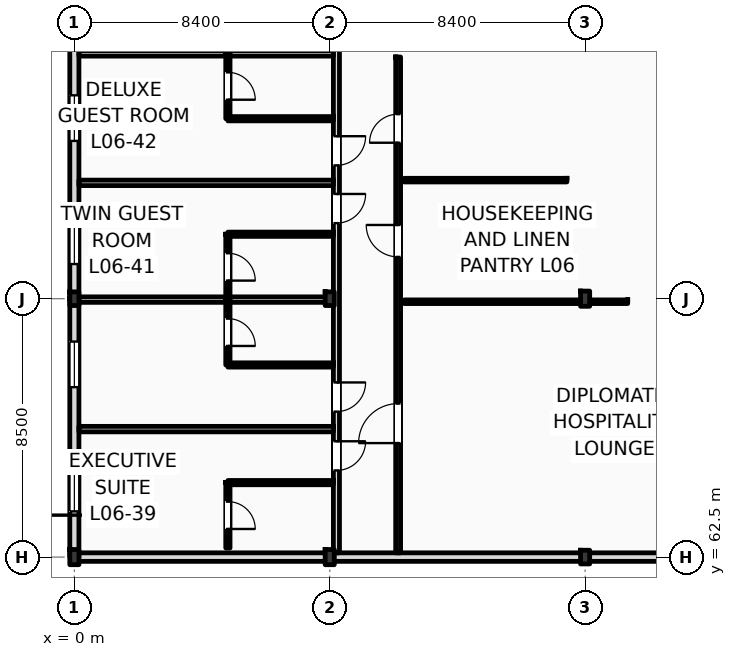
"""IFC4 building model, lengths in metres.
Left out: names, types, materials, properties, quantities, classifications, styles, units other than length and angle.
Written with IfcOpenShell. Run it as: python <this file> out.ifc"""

import sys

from ifc_helpers import new_model, si_unit, direction, frame, frame_2d, origin, origin_2d, place, context, subcontext, project, spatial, rectangle, i_section, extrude, element, fill, save


model = new_model("IFC4")
c1 = context("Model", 3, precision=1e-05, world=origin(), true_north=direction((0.0, 1.0)))
c2 = subcontext(c1, "Body", "Model", "MODEL_VIEW")
j1 = project(units=[si_unit("LENGTHUNIT", "METRE"), si_unit("PLANEANGLEUNIT", "RADIAN")], contexts=[c1])
p1 = place(None, origin())
s1 = spatial("IfcSite", under=j1, at=p1, CompositionType="ELEMENT")
p2 = place(p1, origin())
s2 = spatial("IfcBuilding", under=s1, at=p2, CompositionType="ELEMENT")
p3 = place(p2, frame((0.0, 0.0, 28.2)))
s3 = spatial("IfcBuildingStorey", under=s2, at=p3, CompositionType="ELEMENT", Elevation=28.2)
p4 = place(p3, frame((0.0, 62.5, 0.0), z_axis=(0.0, 0.0, 1.0), x_axis=(1.0, 0.0, 0.0)))
e1 = element("IfcColumn", 1, at=p4, inside=s3, PredefinedType="COLUMN", context=c2, shape_type="SweptSolid", body=[
    extrude(i_section(OverallWidth=0.3, OverallDepth=0.5, WebThickness=0.014, FlangeThickness=0.028, FilletRadius=0.027, at=origin_2d()), origin(), (0.0, 0.0, 1.0), 3.6),
])
p5 = place(p3, frame((0.0, 71.0, 0.0), z_axis=(0.0, 0.0, 1.0), x_axis=(1.0, 0.0, 0.0)))
e2 = element("IfcColumn", 2, at=p5, inside=s3, PredefinedType="COLUMN", context=c2, shape_type="SweptSolid", body=[
    extrude(i_section(OverallWidth=0.3, OverallDepth=0.45, WebThickness=0.014, FlangeThickness=0.026, FilletRadius=0.027, at=origin_2d()), origin(), (0.0, 0.0, 1.0), 3.6),
])
p6 = place(p3, frame((8.4, 62.5, 0.0), z_axis=(0.0, 0.0, 1.0), x_axis=(1.0, 0.0, 0.0)))
e3 = element("IfcColumn", 3, at=p6, inside=s3, PredefinedType="COLUMN", context=c2, shape_type="SweptSolid", body=[
    extrude(i_section(OverallWidth=0.3, OverallDepth=0.5, WebThickness=0.014, FlangeThickness=0.028, FilletRadius=0.027, at=origin_2d()), origin(), (0.0, 0.0, 1.0), 3.6),
])
for number, where, z_axis, x_axis in (
    (4, (8.4, 71.0, 0.0), (0.0, 0.0, 1.0), (1.0, 0.0, 0.0)),
    (5, (16.8, 62.5, 0.0), (0.0, 0.0, 1.0), (1.0, 0.0, 0.0)),
):
    element("IfcColumn", number, at=place(p3, frame(where, z_axis=z_axis, x_axis=x_axis)), inside=s3, PredefinedType="COLUMN", context=c2, shape_type="SweptSolid", body=[
        extrude(i_section(OverallWidth=0.3, OverallDepth=0.45, WebThickness=0.014, FlangeThickness=0.026, FilletRadius=0.027, at=origin_2d()), origin(), (0.0, 0.0, 1.0), 3.6),
    ])
p7 = place(p3, frame((16.8, 71.0, 0.0), z_axis=(0.0, 0.0, 1.0), x_axis=(1.0, 0.0, 0.0)))
e6 = element("IfcColumn", 6, at=p7, inside=s3, PredefinedType="COLUMN", context=c2, shape_type="SweptSolid", body=[
    extrude(i_section(OverallWidth=0.3, OverallDepth=0.5, WebThickness=0.014, FlangeThickness=0.028, FilletRadius=0.027, at=origin_2d()), origin(), (0.0, 0.0, 1.0), 3.6),
])
p8 = place(p3, frame((0.0, 62.5, 0.0), z_axis=(0.0, 0.0, 1.0), x_axis=(0.0, 1.0, 0.0)))
e7 = element("IfcWall", 7, at=p8, inside=s3, PredefinedType="STANDARD", context=c2, shape_type="SweptSolid", body=[
    extrude(rectangle(XDim=8.5, YDim=0.3, at=frame_2d((4.25, 0.0))), origin(), (0.0, 0.0, 1.0), 2.99),
])
p9 = place(p8, frame((1.505, 0.0, 0.9)))
e8 = element("IfcOpeningElement", 8, at=p9, cuts=e7, PredefinedType="OPENING", context=c2, shape_type="SweptSolid", body=[
    extrude(rectangle(XDim=1.5, YDim=1.91, at=frame_2d((0.75, 0.955))), frame((0.0, 0.16, 0.0), z_axis=(0.0, -1.0, 0.0), x_axis=(1.0, 0.0, 0.0)), (0.0, 0.0, 1.0), 0.32),
])
p10 = place(p8, frame((5.59, 0.0, 0.9)))
e9 = element("IfcOpeningElement", 9, at=p10, cuts=e7, PredefinedType="OPENING", context=c2, shape_type="SweptSolid", body=[
    extrude(rectangle(XDim=1.5, YDim=1.91, at=frame_2d((0.75, 0.955))), frame((0.0, 0.16, 0.0), z_axis=(0.0, -1.0, 0.0), x_axis=(1.0, 0.0, 0.0)), (0.0, 0.0, 1.0), 0.32),
])
p11 = place(p3, frame((0.0, 71.0, 0.0), z_axis=(0.0, 0.0, 1.0), x_axis=(0.0, 1.0, 0.0)))
e10 = element("IfcWall", 10, at=p11, inside=s3, PredefinedType="STANDARD", context=c2, shape_type="SweptSolid", body=[
    extrude(rectangle(XDim=8.5, YDim=0.3, at=frame_2d((4.25, 0.0))), origin(), (0.0, 0.0, 1.0), 2.99),
])
p12 = place(p11, frame((1.14, 0.0, 0.9)))
e11 = element("IfcOpeningElement", 11, at=p12, cuts=e10, PredefinedType="OPENING", context=c2, shape_type="SweptSolid", body=[
    extrude(rectangle(XDim=1.5, YDim=1.91, at=frame_2d((0.75, 0.955))), frame((0.0, 0.16, 0.0), z_axis=(0.0, -1.0, 0.0), x_axis=(1.0, 0.0, 0.0)), (0.0, 0.0, 1.0), 0.32),
])
p13 = place(p11, frame((5.19, 0.0, 0.9)))
e12 = element("IfcOpeningElement", 12, at=p13, cuts=e10, PredefinedType="OPENING", context=c2, shape_type="SweptSolid", body=[
    extrude(rectangle(XDim=1.5, YDim=1.91, at=frame_2d((0.75, 0.955))), frame((0.0, 0.16, 0.0), z_axis=(0.0, -1.0, 0.0), x_axis=(1.0, 0.0, 0.0)), (0.0, 0.0, 1.0), 0.32),
])
p14 = place(p3, frame((0.0, 62.5, 0.0), z_axis=(0.0, 0.0, 1.0), x_axis=(1.0, 0.0, 0.0)))
e13 = element("IfcWall", 13, at=p14, inside=s3, PredefinedType="STANDARD", context=c2, shape_type="SweptSolid", body=[
    extrude(rectangle(XDim=25.2, YDim=0.28, at=frame_2d((12.6, 0.0))), origin(), (0.0, 0.0, 1.0), 2.8),
])
p15 = place(p3, frame((8.62, 62.64, 0.0), z_axis=(0.0, 0.0, 1.0), x_axis=(0.0, 1.0, 0.0)))
e14 = element("IfcWall", 14, at=p15, inside=s3, PredefinedType="PARTITIONING", context=c2, shape_type="SweptSolid", body=[
    extrude(rectangle(XDim=32.66, YDim=0.2, at=frame_2d((16.33, 0.0))), origin(), (0.0, 0.0, 1.0), 2.99),
])
p16 = place(p15, frame((2.71, 0.0, 0.0)))
e15 = element("IfcOpeningElement", 15, at=p16, cuts=e14, PredefinedType="OPENING", context=c2, shape_type="SweptSolid", body=[
    extrude(rectangle(XDim=0.96, YDim=2.2, at=frame_2d((0.48, 1.1))), frame((0.0, 0.11, 0.0), z_axis=(0.0, -1.0, 0.0), x_axis=(1.0, 0.0, 0.0)), (0.0, 0.0, 1.0), 0.22),
])
p17 = place(p15, frame((4.645, 0.0, 0.0)))
e16 = element("IfcOpeningElement", 16, at=p17, cuts=e14, PredefinedType="OPENING", context=c2, shape_type="SweptSolid", body=[
    extrude(rectangle(XDim=0.96, YDim=2.2, at=frame_2d((0.48, 1.1))), frame((0.0, 0.11, 0.0), z_axis=(0.0, -1.0, 0.0), x_axis=(1.0, 0.0, 0.0)), (0.0, 0.0, 1.0), 0.22),
])
p18 = place(p15, frame((10.845, 0.0, 0.0)))
e17 = element("IfcOpeningElement", 17, at=p18, cuts=e14, PredefinedType="OPENING", context=c2, shape_type="SweptSolid", body=[
    extrude(rectangle(XDim=0.96, YDim=2.2, at=frame_2d((0.48, 1.1))), frame((0.0, 0.11, 0.0), z_axis=(0.0, -1.0, 0.0), x_axis=(1.0, 0.0, 0.0)), (0.0, 0.0, 1.0), 0.22),
])
p19 = place(p15, frame((12.745, 0.0, 0.0)))
e18 = element("IfcOpeningElement", 18, at=p19, cuts=e14, PredefinedType="OPENING", context=c2, shape_type="SweptSolid", body=[
    extrude(rectangle(XDim=0.96, YDim=2.2, at=frame_2d((0.48, 1.1))), frame((0.0, 0.11, 0.0), z_axis=(0.0, -1.0, 0.0), x_axis=(1.0, 0.0, 0.0)), (0.0, 0.0, 1.0), 0.22),
])
p20 = place(p15, frame((18.945, 0.0, 0.0)))
e19 = element("IfcOpeningElement", 19, at=p20, cuts=e14, PredefinedType="OPENING", context=c2, shape_type="SweptSolid", body=[
    extrude(rectangle(XDim=0.96, YDim=2.2, at=frame_2d((0.48, 1.1))), frame((0.0, 0.11, 0.0), z_axis=(0.0, -1.0, 0.0), x_axis=(1.0, 0.0, 0.0)), (0.0, 0.0, 1.0), 0.22),
])
p21 = place(p15, frame((22.995, 0.0, 0.0)))
e20 = element("IfcOpeningElement", 20, at=p21, cuts=e14, PredefinedType="OPENING", context=c2, shape_type="SweptSolid", body=[
    extrude(rectangle(XDim=0.96, YDim=2.2, at=frame_2d((0.48, 1.1))), frame((0.0, 0.11, 0.0), z_axis=(0.0, -1.0, 0.0), x_axis=(1.0, 0.0, 0.0)), (0.0, 0.0, 1.0), 0.22),
])
p22 = place(p15, frame((27.045, 0.0, 0.0)))
e21 = element("IfcOpeningElement", 21, at=p22, cuts=e14, PredefinedType="OPENING", context=c2, shape_type="SweptSolid", body=[
    extrude(rectangle(XDim=0.96, YDim=2.2, at=frame_2d((0.48, 1.1))), frame((0.0, 0.11, 0.0), z_axis=(0.0, -1.0, 0.0), x_axis=(1.0, 0.0, 0.0)), (0.0, 0.0, 1.0), 0.22),
])
p23 = place(p15, frame((31.06, 0.0, 0.0)))
e22 = element("IfcOpeningElement", 22, at=p23, cuts=e14, PredefinedType="OPENING", context=c2, shape_type="SweptSolid", body=[
    extrude(rectangle(XDim=0.96, YDim=2.2, at=frame_2d((0.48, 1.1))), frame((0.0, 0.11, 0.0), z_axis=(0.0, -1.0, 0.0), x_axis=(1.0, 0.0, 0.0)), (0.0, 0.0, 1.0), 0.22),
])
p24 = place(p3, frame((10.65, 62.64, 0.0), z_axis=(0.0, 0.0, 1.0), x_axis=(0.0, 1.0, 0.0)))
e23 = element("IfcWall", 23, at=p24, inside=s3, PredefinedType="PARTITIONING", context=c2, shape_type="SweptSolid", body=[
    extrude(rectangle(XDim=16.31, YDim=0.16, at=frame_2d((8.155, 0.0))), origin(), (0.0, 0.0, 1.0), 3.36),
])
p25 = place(p24, frame((3.61, 0.0, 0.0)))
e24 = element("IfcOpeningElement", 24, at=p25, cuts=e23, PredefinedType="OPENING", context=c2, shape_type="SweptSolid", body=[
    extrude(rectangle(XDim=1.3, YDim=2.2, at=frame_2d((0.65, 1.1))), frame((0.0, 0.09, 0.0), z_axis=(0.0, -1.0, 0.0), x_axis=(1.0, 0.0, 0.0)), (0.0, 0.0, 1.0), 0.18),
])
p26 = place(p24, frame((9.735, 0.0, 0.0)))
e25 = element("IfcOpeningElement", 25, at=p26, cuts=e23, PredefinedType="OPENING", context=c2, shape_type="SweptSolid", body=[
    extrude(rectangle(XDim=1.05, YDim=2.12, at=frame_2d((0.525, 1.06))), frame((0.0, 0.09, 0.0), z_axis=(0.0, -1.0, 0.0), x_axis=(1.0, 0.0, 0.0)), (0.0, 0.0, 1.0), 0.18),
])
p27 = place(p24, frame((13.49, 0.0, 0.0)))
e26 = element("IfcOpeningElement", 26, at=p27, cuts=e23, PredefinedType="OPENING", context=c2, shape_type="SweptSolid", body=[
    extrude(rectangle(XDim=0.94, YDim=2.15, at=frame_2d((0.47, 1.075))), frame((0.0, 0.09, 0.0), z_axis=(0.0, -1.0, 0.0), x_axis=(1.0, 0.0, 0.0)), (0.0, 0.0, 1.0), 0.18),
])
p28 = place(p3, frame((0.15, 66.71, 0.0), z_axis=(0.0, 0.0, 1.0), x_axis=(1.0, 0.0, 0.0)))
e27 = element("IfcWall", 27, at=p28, inside=s3, PredefinedType="PARTITIONING", context=c2, shape_type="SweptSolid", body=[
    extrude(rectangle(XDim=8.37, YDim=0.18, at=frame_2d((4.185, 0.0))), origin(), (0.0, 0.0, 1.0), 3.36),
])
p29 = place(p3, frame((5.05, 64.95, 0.0), z_axis=(0.0, 0.0, 1.0), x_axis=(1.0, 0.0, 0.0)))
e28 = element("IfcWall", 28, at=p29, inside=s3, PredefinedType="PARTITIONING", context=c2, shape_type="SweptSolid", body=[
    extrude(rectangle(XDim=3.47, YDim=0.14, at=frame_2d((1.735, 0.0))), origin(), (0.0, 0.0, 1.0), 3.36),
])
p30 = place(p3, frame((5.05, 62.8, 0.0), z_axis=(0.0, 0.0, 1.0), x_axis=(0.0, 1.0, 0.0)))
e29 = element("IfcWall", 29, at=p30, inside=s3, PredefinedType="PARTITIONING", context=c2, shape_type="SweptSolid", body=[
    extrude(rectangle(XDim=2.15, YDim=0.14, at=frame_2d((1.075, 0.0))), origin(), (0.0, 0.0, 1.0), 3.36),
])
p31 = place(p30, frame((0.625, 0.0, 0.0)))
e30 = element("IfcOpeningElement", 30, at=p31, cuts=e29, PredefinedType="OPENING", context=c2, shape_type="SweptSolid", body=[
    extrude(rectangle(XDim=0.9, YDim=2.1, at=frame_2d((0.45, 1.05))), frame((0.0, 0.08, 0.0), z_axis=(0.0, -1.0, 0.0), x_axis=(1.0, 0.0, 0.0)), (0.0, 0.0, 1.0), 0.16),
])
p32 = place(p3, frame((0.15, 70.97, 0.0), z_axis=(0.0, 0.0, 1.0), x_axis=(1.0, 0.0, 0.0)))
e31 = element("IfcWall", 31, at=p32, inside=s3, PredefinedType="PARTITIONING", context=c2, shape_type="SweptSolid", body=[
    extrude(rectangle(XDim=8.37, YDim=0.18, at=frame_2d((4.185, 0.0))), origin(), (0.0, 0.0, 1.0), 2.8),
])
p33 = place(p3, frame((5.05, 68.82, 0.0), z_axis=(0.0, 0.0, 1.0), x_axis=(1.0, 0.0, 0.0)))
e32 = element("IfcWall", 32, at=p33, inside=s3, PredefinedType="PARTITIONING", context=c2, shape_type="SweptSolid", body=[
    extrude(rectangle(XDim=3.47, YDim=0.14, at=frame_2d((1.735, 0.0))), origin(), (0.0, 0.0, 1.0), 3.36),
])
p34 = place(p3, frame((5.05, 68.82, 0.0), z_axis=(0.0, 0.0, 1.0), x_axis=(0.0, 1.0, 0.0)))
e33 = element("IfcWall", 33, at=p34, inside=s3, PredefinedType="PARTITIONING", context=c2, shape_type="SweptSolid", body=[
    extrude(rectangle(XDim=2.15, YDim=0.14, at=frame_2d((1.075, 0.0))), origin(), (0.0, 0.0, 1.0), 3.36),
])
p35 = place(p34, frame((0.625, 0.0, 0.0)))
e34 = element("IfcOpeningElement", 34, at=p35, cuts=e33, PredefinedType="OPENING", context=c2, shape_type="SweptSolid", body=[
    extrude(rectangle(XDim=0.9, YDim=2.1, at=frame_2d((0.45, 1.05))), frame((0.0, 0.08, 0.0), z_axis=(0.0, -1.0, 0.0), x_axis=(1.0, 0.0, 0.0)), (0.0, 0.0, 1.0), 0.16),
])
p36 = place(p3, frame((0.15, 74.81, 0.0), z_axis=(0.0, 0.0, 1.0), x_axis=(1.0, 0.0, 0.0)))
e35 = element("IfcWall", 35, at=p36, inside=s3, PredefinedType="PARTITIONING", context=c2, shape_type="SweptSolid", body=[
    extrude(rectangle(XDim=8.37, YDim=0.18, at=frame_2d((4.185, 0.0))), origin(), (0.0, 0.0, 1.0), 3.36),
])
p37 = place(p3, frame((5.05, 73.12, 0.0), z_axis=(0.0, 0.0, 1.0), x_axis=(1.0, 0.0, 0.0)))
e36 = element("IfcWall", 36, at=p37, inside=s3, PredefinedType="PARTITIONING", context=c2, shape_type="SweptSolid", body=[
    extrude(rectangle(XDim=3.47, YDim=0.14, at=frame_2d((1.735, 0.0))), origin(), (0.0, 0.0, 1.0), 3.36),
])
p38 = place(p3, frame((5.05, 70.97, 0.0), z_axis=(0.0, 0.0, 1.0), x_axis=(0.0, 1.0, 0.0)))
e37 = element("IfcWall", 37, at=p38, inside=s3, PredefinedType="PARTITIONING", context=c2, shape_type="SweptSolid", body=[
    extrude(rectangle(XDim=2.15, YDim=0.14, at=frame_2d((1.075, 0.0))), origin(), (0.0, 0.0, 1.0), 3.36),
])
p39 = place(p38, frame((0.625, 0.0, 0.0)))
e38 = element("IfcOpeningElement", 38, at=p39, cuts=e37, PredefinedType="OPENING", context=c2, shape_type="SweptSolid", body=[
    extrude(rectangle(XDim=0.9, YDim=2.1, at=frame_2d((0.45, 1.05))), frame((0.0, 0.08, 0.0), z_axis=(0.0, -1.0, 0.0), x_axis=(1.0, 0.0, 0.0)), (0.0, 0.0, 1.0), 0.16),
])
p40 = place(p3, frame((0.15, 79.07, 0.0), z_axis=(0.0, 0.0, 1.0), x_axis=(1.0, 0.0, 0.0)))
e39 = element("IfcWall", 39, at=p40, inside=s3, PredefinedType="PARTITIONING", context=c2, shape_type="SweptSolid", body=[
    extrude(rectangle(XDim=8.37, YDim=0.18, at=frame_2d((4.185, 0.0))), origin(), (0.0, 0.0, 1.0), 3.36),
])
p41 = place(p3, frame((5.05, 76.92, 0.0), z_axis=(0.0, 0.0, 1.0), x_axis=(1.0, 0.0, 0.0)))
e40 = element("IfcWall", 40, at=p41, inside=s3, PredefinedType="PARTITIONING", context=c2, shape_type="SweptSolid", body=[
    extrude(rectangle(XDim=3.47, YDim=0.14, at=frame_2d((1.735, 0.0))), origin(), (0.0, 0.0, 1.0), 3.36),
])
p42 = place(p3, frame((5.05, 76.92, 0.0), z_axis=(0.0, 0.0, 1.0), x_axis=(0.0, 1.0, 0.0)))
e41 = element("IfcWall", 41, at=p42, inside=s3, PredefinedType="PARTITIONING", context=c2, shape_type="SweptSolid", body=[
    extrude(rectangle(XDim=2.15, YDim=0.14, at=frame_2d((1.075, 0.0))), origin(), (0.0, 0.0, 1.0), 3.36),
])
p43 = place(p42, frame((0.625, 0.0, 0.0)))
e42 = element("IfcOpeningElement", 42, at=p43, cuts=e41, PredefinedType="OPENING", context=c2, shape_type="SweptSolid", body=[
    extrude(rectangle(XDim=0.9, YDim=2.1, at=frame_2d((0.45, 1.05))), frame((0.0, 0.08, 0.0), z_axis=(0.0, -1.0, 0.0), x_axis=(1.0, 0.0, 0.0)), (0.0, 0.0, 1.0), 0.16),
])
p44 = place(p3, frame((5.05, 79.07, 0.0), z_axis=(0.0, 0.0, 1.0), x_axis=(0.0, 1.0, 0.0)))
e43 = element("IfcWall", 43, at=p44, inside=s3, PredefinedType="PARTITIONING", context=c2, shape_type="SweptSolid", body=[
    extrude(rectangle(XDim=2.15, YDim=0.14, at=frame_2d((1.075, 0.0))), origin(), (0.0, 0.0, 1.0), 3.36),
])
p45 = place(p44, frame((0.625, 0.0, 0.0)))
e44 = element("IfcOpeningElement", 44, at=p45, cuts=e43, PredefinedType="OPENING", context=c2, shape_type="SweptSolid", body=[
    extrude(rectangle(XDim=0.9, YDim=2.1, at=frame_2d((0.45, 1.05))), frame((0.0, 0.08, 0.0), z_axis=(0.0, -1.0, 0.0), x_axis=(1.0, 0.0, 0.0)), (0.0, 0.0, 1.0), 0.16),
])
p46 = place(p3, frame((10.85, 70.9, 0.0), z_axis=(0.0, 0.0, 1.0), x_axis=(1.0, 0.0, 0.0)))
e45 = element("IfcWall", 45, at=p46, inside=s3, PredefinedType="PARTITIONING", context=c2, shape_type="SweptSolid", body=[
    extrude(rectangle(XDim=7.35, YDim=0.12, at=frame_2d((3.675, 0.0))), origin(), (0.0, 0.0, 1.0), 2.8),
])
p47 = place(p3, frame((10.85, 74.9, 0.0), z_axis=(0.0, 0.0, 1.0), x_axis=(1.0, 0.0, 0.0)))
e46 = element("IfcWall", 46, at=p47, inside=s3, PredefinedType="PARTITIONING", context=c2, shape_type="SweptSolid", body=[
    extrude(rectangle(XDim=5.35, YDim=0.12, at=frame_2d((2.675, 0.0))), origin(), (0.0, 0.0, 1.0), 3.36),
])
p48 = place(p9, origin())
e47 = element("IfcWindow", 47, at=p48, inside=s3, PartitioningType="DOUBLE_PANEL_VERTICAL", PredefinedType="WINDOW", context=c2, shape_type="SweptSolid", body=[
    extrude(rectangle(XDim=1.5, YDim=1.91, at=frame_2d((0.75, 0.955))), frame((0.0, 0.03, 0.0), z_axis=(0.0, -1.0, 0.0), x_axis=(1.0, 0.0, 0.0)), (0.0, 0.0, 1.0), 0.06),
])
fill(e8, e47)
p49 = place(p10, origin())
e48 = element("IfcWindow", 48, at=p49, inside=s3, PartitioningType="DOUBLE_PANEL_VERTICAL", PredefinedType="WINDOW", context=c2, shape_type="SweptSolid", body=[
    extrude(rectangle(XDim=1.5, YDim=1.91, at=frame_2d((0.75, 0.955))), frame((0.0, 0.03, 0.0), z_axis=(0.0, -1.0, 0.0), x_axis=(1.0, 0.0, 0.0)), (0.0, 0.0, 1.0), 0.06),
])
fill(e9, e48)
p50 = place(p12, origin())
e49 = element("IfcWindow", 49, at=p50, inside=s3, PartitioningType="DOUBLE_PANEL_VERTICAL", PredefinedType="WINDOW", context=c2, shape_type="SweptSolid", body=[
    extrude(rectangle(XDim=1.5, YDim=1.91, at=frame_2d((0.75, 0.955))), frame((0.0, 0.03, 0.0), z_axis=(0.0, -1.0, 0.0), x_axis=(1.0, 0.0, 0.0)), (0.0, 0.0, 1.0), 0.06),
])
fill(e11, e49)
p51 = place(p13, origin())
e50 = element("IfcWindow", 50, at=p51, inside=s3, PartitioningType="DOUBLE_PANEL_VERTICAL", PredefinedType="WINDOW", context=c2, shape_type="SweptSolid", body=[
    extrude(rectangle(XDim=1.5, YDim=1.91, at=frame_2d((0.75, 0.955))), frame((0.0, 0.03, 0.0), z_axis=(0.0, -1.0, 0.0), x_axis=(1.0, 0.0, 0.0)), (0.0, 0.0, 1.0), 0.06),
])
fill(e12, e50)
p52 = place(p16, frame((0.96, 0.0, 0.0), z_axis=(0.0, 0.0, 1.0), x_axis=(-1.0, 0.0, 0.0)))
e51 = element("IfcDoor", 51, at=p52, inside=s3, OperationType="SINGLE_SWING_RIGHT", PredefinedType="DOOR", context=c2, shape_type="SweptSolid", body=[
    extrude(rectangle(XDim=0.96, YDim=2.2, at=frame_2d((0.48, 1.1))), frame((0.0, 0.025, 0.0), z_axis=(0.0, -1.0, 0.0), x_axis=(1.0, 0.0, 0.0)), (0.0, 0.0, 1.0), 0.05),
])
fill(e15, e51)
p53 = place(p31, frame((0.9, 0.0, 0.0), z_axis=(0.0, 0.0, 1.0), x_axis=(-1.0, 0.0, 0.0)))
e52 = element("IfcDoor", 52, at=p53, inside=s3, OperationType="SINGLE_SWING_LEFT", PredefinedType="DOOR", context=c2, shape_type="SweptSolid", body=[
    extrude(rectangle(XDim=0.9, YDim=2.1, at=frame_2d((0.45, 1.05))), frame((0.0, 0.025, 0.0), z_axis=(0.0, -1.0, 0.0), x_axis=(1.0, 0.0, 0.0)), (0.0, 0.0, 1.0), 0.05),
])
fill(e30, e52)
p54 = place(p17, frame((0.96, 0.0, 0.0), z_axis=(0.0, 0.0, 1.0), x_axis=(-1.0, 0.0, 0.0)))
e53 = element("IfcDoor", 53, at=p54, inside=s3, OperationType="SINGLE_SWING_RIGHT", PredefinedType="DOOR", context=c2, shape_type="SweptSolid", body=[
    extrude(rectangle(XDim=0.96, YDim=2.2, at=frame_2d((0.48, 1.1))), frame((0.0, 0.025, 0.0), z_axis=(0.0, -1.0, 0.0), x_axis=(1.0, 0.0, 0.0)), (0.0, 0.0, 1.0), 0.05),
])
fill(e16, e53)
p55 = place(p35, frame((0.9, 0.0, 0.0), z_axis=(0.0, 0.0, 1.0), x_axis=(-1.0, 0.0, 0.0)))
e54 = element("IfcDoor", 54, at=p55, inside=s3, OperationType="SINGLE_SWING_LEFT", PredefinedType="DOOR", context=c2, shape_type="SweptSolid", body=[
    extrude(rectangle(XDim=0.9, YDim=2.1, at=frame_2d((0.45, 1.05))), frame((0.0, 0.025, 0.0), z_axis=(0.0, -1.0, 0.0), x_axis=(1.0, 0.0, 0.0)), (0.0, 0.0, 1.0), 0.05),
])
fill(e34, e54)
p56 = place(p18, frame((0.96, 0.0, 0.0), z_axis=(0.0, 0.0, 1.0), x_axis=(-1.0, 0.0, 0.0)))
e55 = element("IfcDoor", 55, at=p56, inside=s3, OperationType="SINGLE_SWING_RIGHT", PredefinedType="DOOR", context=c2, shape_type="SweptSolid", body=[
    extrude(rectangle(XDim=0.96, YDim=2.2, at=frame_2d((0.48, 1.1))), frame((0.0, 0.025, 0.0), z_axis=(0.0, -1.0, 0.0), x_axis=(1.0, 0.0, 0.0)), (0.0, 0.0, 1.0), 0.05),
])
fill(e17, e55)
p57 = place(p39, frame((0.9, 0.0, 0.0), z_axis=(0.0, 0.0, 1.0), x_axis=(-1.0, 0.0, 0.0)))
e56 = element("IfcDoor", 56, at=p57, inside=s3, OperationType="SINGLE_SWING_LEFT", PredefinedType="DOOR", context=c2, shape_type="SweptSolid", body=[
    extrude(rectangle(XDim=0.9, YDim=2.1, at=frame_2d((0.45, 1.05))), frame((0.0, 0.025, 0.0), z_axis=(0.0, -1.0, 0.0), x_axis=(1.0, 0.0, 0.0)), (0.0, 0.0, 1.0), 0.05),
])
fill(e38, e56)
p58 = place(p19, frame((0.96, 0.0, 0.0), z_axis=(0.0, 0.0, 1.0), x_axis=(-1.0, 0.0, 0.0)))
e57 = element("IfcDoor", 57, at=p58, inside=s3, OperationType="SINGLE_SWING_RIGHT", PredefinedType="DOOR", context=c2, shape_type="SweptSolid", body=[
    extrude(rectangle(XDim=0.96, YDim=2.2, at=frame_2d((0.48, 1.1))), frame((0.0, 0.025, 0.0), z_axis=(0.0, -1.0, 0.0), x_axis=(1.0, 0.0, 0.0)), (0.0, 0.0, 1.0), 0.05),
])
fill(e18, e57)
p59 = place(p43, frame((0.9, 0.0, 0.0), z_axis=(0.0, 0.0, 1.0), x_axis=(-1.0, 0.0, 0.0)))
e58 = element("IfcDoor", 58, at=p59, inside=s3, OperationType="SINGLE_SWING_LEFT", PredefinedType="DOOR", context=c2, shape_type="SweptSolid", body=[
    extrude(rectangle(XDim=0.9, YDim=2.1, at=frame_2d((0.45, 1.05))), frame((0.0, 0.025, 0.0), z_axis=(0.0, -1.0, 0.0), x_axis=(1.0, 0.0, 0.0)), (0.0, 0.0, 1.0), 0.05),
])
fill(e42, e58)
p60 = place(p25, origin())
e59 = element("IfcDoor", 59, at=p60, inside=s3, OperationType="SINGLE_SWING_LEFT", PredefinedType="DOOR", context=c2, shape_type="SweptSolid", body=[
    extrude(rectangle(XDim=1.3, YDim=2.2, at=frame_2d((0.65, 1.1))), frame((0.0, 0.025, 0.0), z_axis=(0.0, -1.0, 0.0), x_axis=(1.0, 0.0, 0.0)), (0.0, 0.0, 1.0), 0.05),
])
fill(e24, e59)
p61 = place(p26, origin())
e60 = element("IfcDoor", 60, at=p61, inside=s3, OperationType="SINGLE_SWING_RIGHT", PredefinedType="DOOR", context=c2, shape_type="SweptSolid", body=[
    extrude(rectangle(XDim=1.05, YDim=2.12, at=frame_2d((0.525, 1.06))), frame((0.0, 0.025, 0.0), z_axis=(0.0, -1.0, 0.0), x_axis=(1.0, 0.0, 0.0)), (0.0, 0.0, 1.0), 0.05),
])
fill(e25, e60)
p62 = place(p27, origin())
e61 = element("IfcDoor", 61, at=p62, inside=s3, OperationType="SINGLE_SWING_LEFT", PredefinedType="DOOR", context=c2, shape_type="SweptSolid", body=[
    extrude(rectangle(XDim=0.94, YDim=2.15, at=frame_2d((0.47, 1.075))), frame((0.0, 0.025, 0.0), z_axis=(0.0, -1.0, 0.0), x_axis=(1.0, 0.0, 0.0)), (0.0, 0.0, 1.0), 0.05),
])
fill(e26, e61)
save(model, sys.argv[1])
